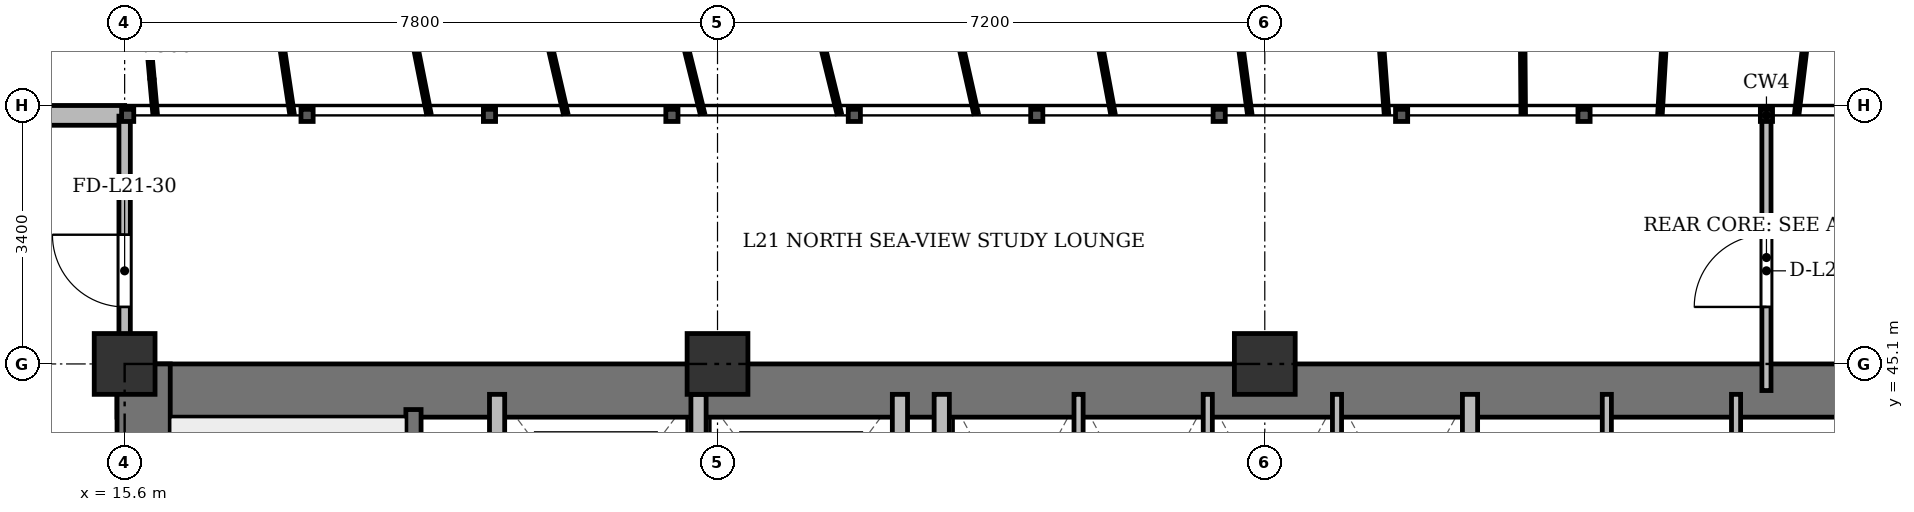
"""IFC4 building model, lengths in metres.
Left out: names, types, materials, properties, quantities, classifications, styles, units other than length and angle.
Written with IfcOpenShell. Run it as: python <this file> out.ifc"""

import sys

from ifc_helpers import new_model, si_unit, direction, frame, frame_2d, origin, origin_2d, place, context, subcontext, project, spatial, rectangle, extrude, source, transform, mapped, element, fill, save


model = new_model("IFC4")
c1 = context("Model", 3, precision=1e-05, world=origin(), true_north=direction((0.0, 1.0)))
c2 = subcontext(c1, "Body", "Model", "MODEL_VIEW")
j1 = project(units=[si_unit("LENGTHUNIT", "METRE"), si_unit("PLANEANGLEUNIT", "RADIAN")], contexts=[c1])
p1 = place(None, origin())
s1 = spatial("IfcSite", under=j1, at=p1, CompositionType="ELEMENT")
p2 = place(p1, origin())
s2 = spatial("IfcBuilding", under=s1, at=p2, CompositionType="ELEMENT")
p3 = place(p2, frame((0.0, 0.0, 85.3)))
s3 = spatial("IfcBuildingStorey", under=s2, at=p3, CompositionType="ELEMENT", Elevation=85.3)
m1 = source(origin(), c2, "Body", "SweptSolid", [
    extrude(rectangle(XDim=0.8, YDim=0.8, at=origin_2d()), origin(), (0.0, 0.0, 1.0), 3.6),
])
for number, where, z_axis, x_axis in (
    (1, (15.6, 45.1, 0.0), (0.0, 0.0, 1.0), (1.0, 0.0, 0.0)),
    (2, (23.4, 45.1, 0.0), (0.0, 0.0, 1.0), (1.0, 0.0, 0.0)),
    (3, (30.6, 45.1, 0.0), (0.0, 0.0, 1.0), (1.0, 0.0, 0.0)),
):
    element("IfcColumn", number, at=place(p3, frame(where, z_axis=z_axis, x_axis=x_axis)), inside=s3, PredefinedType="COLUMN", context=c2, shape_type="MappedRepresentation", body=[
        mapped(m1, transform((0.0, 0.0, 0.0), x_axis=(1.0, 0.0, 0.0), y_axis=(0.0, 1.0, 0.0), z_axis=(0.0, 0.0, 1.0), scale=1.0)),
    ])
p4 = place(p3, frame((7.6, 48.37, 0.0), z_axis=(0.0, 0.0, 1.0), x_axis=(1.0, 0.0, 0.0)))
e4 = element("IfcWall", 4, at=p4, inside=s3, PredefinedType="SOLIDWALL", context=c2, shape_type="SweptSolid", body=[
    extrude(rectangle(XDim=8.0, YDim=0.26, at=frame_2d((4.0, 0.0))), origin(), (0.0, 0.0, 1.0), 3.34),
])
p5 = place(p4, frame((3.325, 0.0, 0.9)))
e5 = element("IfcOpeningElement", 5, at=p5, cuts=e4, PredefinedType="OPENING", context=c2, shape_type="SweptSolid", body=[
    extrude(rectangle(XDim=1.35, YDim=1.5, at=frame_2d((0.675, 0.75))), frame((0.0, 0.14, 0.0), z_axis=(0.0, -1.0, 0.0), x_axis=(1.0, 0.0, 0.0)), (0.0, 0.0, 1.0), 0.28),
])
p6 = place(p3, frame((15.5, 44.75, 0.0), z_axis=(0.0, 0.0, 1.0), x_axis=(1.0, 0.0, 0.0)))
e6 = element("IfcWall", 6, at=p6, inside=s3, PredefinedType="SHEAR", context=c2, shape_type="SweptSolid", body=[
    extrude(rectangle(XDim=43.4, YDim=0.7, at=frame_2d((21.7, 0.0))), origin(), (0.0, 0.0, 1.0), 3.34),
])
p7 = place(p3, frame((15.85, 33.4, 0.0), z_axis=(0.0, 0.0, 1.0), x_axis=(0.0, 1.0, 0.0)))
e7 = element("IfcWall", 7, at=p7, inside=s3, PredefinedType="SHEAR", context=c2, shape_type="SweptSolid", body=[
    extrude(rectangle(XDim=11.7, YDim=0.7, at=frame_2d((5.85, 0.0))), origin(), (0.0, 0.0, 1.0), 3.34),
])
p8 = place(p3, frame((19.4, 33.4, 0.0), z_axis=(0.0, 0.0, 1.0), x_axis=(0.0, 1.0, 0.0)))
e8 = element("IfcWall", 8, at=p8, inside=s3, PredefinedType="SHEAR", context=c2, shape_type="SweptSolid", body=[
    extrude(rectangle(XDim=11.1, YDim=0.2, at=frame_2d((5.55, 0.0))), origin(), (0.0, 0.0, 1.0), 3.34),
])
p9 = place(p8, frame((0.85, 0.0, 0.0)))
e9 = element("IfcOpeningElement", 9, at=p9, cuts=e8, PredefinedType="OPENING", context=c2, shape_type="SweptSolid", body=[
    extrude(rectangle(XDim=1.1, YDim=2.15, at=frame_2d((0.55, 1.075))), frame((0.0, 0.11, 0.0), z_axis=(0.0, -1.0, 0.0), x_axis=(1.0, 0.0, 0.0)), (0.0, 0.0, 1.0), 0.22),
])
for number, where, z_axis, x_axis in (
    (10, (20.5, 41.3, 0.0), (0.0, 0.0, 1.0), (0.0, 1.0, 0.0)),
    (11, (23.15, 41.3, 0.0), (0.0, 0.0, 1.0), (0.0, 1.0, 0.0)),
    (12, (25.8, 41.3, 0.0), (0.0, 0.0, 1.0), (0.0, 1.0, 0.0)),
):
    element("IfcWall", number, at=place(p3, frame(where, z_axis=z_axis, x_axis=x_axis)), inside=s3, PredefinedType="SOLIDWALL", context=c2, shape_type="SweptSolid", body=[
        extrude(rectangle(XDim=3.4, YDim=0.2, at=frame_2d((1.7, 0.0))), origin(), (0.0, 0.0, 1.0), 3.34),
    ])
p10 = place(p3, frame((26.35, 33.4, 0.0), z_axis=(0.0, 0.0, 1.0), x_axis=(0.0, 1.0, 0.0)))
e13 = element("IfcWall", 13, at=p10, inside=s3, PredefinedType="SOLIDWALL", context=c2, shape_type="SweptSolid", body=[
    extrude(rectangle(XDim=11.3, YDim=0.2, at=frame_2d((5.65, 0.0))), origin(), (0.0, 0.0, 1.0), 2.752),
])
p11 = place(p3, frame((33.3, 41.5, 0.0), z_axis=(0.0, 0.0, 1.0), x_axis=(0.0, 1.0, 0.0)))
e14 = element("IfcWall", 14, at=p11, inside=s3, PredefinedType="SOLIDWALL", context=c2, shape_type="SweptSolid", body=[
    extrude(rectangle(XDim=3.2, YDim=0.2, at=frame_2d((1.6, 0.0))), origin(), (0.0, 0.0, 1.0), 3.34),
])
for number, where, z_axis, x_axis in (
    (15, (28.15, 41.5, 0.0), (0.0, 0.0, 1.0), (0.0, 1.0, 0.0)),
    (16, (29.85, 41.5, 0.0), (0.0, 0.0, 1.0), (0.0, 1.0, 0.0)),
    (17, (31.55, 41.5, 0.0), (0.0, 0.0, 1.0), (0.0, 1.0, 0.0)),
    (18, (35.1, 41.5, 0.0), (0.0, 0.0, 1.0), (0.0, 1.0, 0.0)),
    (19, (36.8, 41.5, 0.0), (0.0, 0.0, 1.0), (0.0, 1.0, 0.0)),
):
    element("IfcWall", number, at=place(p3, frame(where, z_axis=z_axis, x_axis=x_axis)), inside=s3, PredefinedType="PARTITIONING", context=c2, shape_type="SweptSolid", body=[
        extrude(rectangle(XDim=3.2, YDim=0.12, at=frame_2d((1.6, 0.0))), origin(), (0.0, 0.0, 1.0), 3.34),
    ])
p12 = place(p3, frame((37.2, 44.75, 0.0), z_axis=(0.0, 0.0, 1.0), x_axis=(0.0, 1.0, 0.0)))
e20 = element("IfcWall", 20, at=p12, inside=s3, PredefinedType="PARTITIONING", context=c2, shape_type="SweptSolid", body=[
    extrude(rectangle(XDim=3.61, YDim=0.12, at=frame_2d((1.805, 0.0))), origin(), (0.0, 0.0, 1.0), 2.752),
])
p13 = place(p12, frame((1.1, 0.0, 0.0)))
e21 = element("IfcOpeningElement", 21, at=p13, cuts=e20, PredefinedType="OPENING", context=c2, shape_type="SweptSolid", body=[
    extrude(rectangle(XDim=0.95, YDim=2.15, at=frame_2d((0.475, 1.075))), frame((0.0, 0.07, 0.0), z_axis=(0.0, -1.0, 0.0), x_axis=(1.0, 0.0, 0.0)), (0.0, 0.0, 1.0), 0.14),
])
p14 = place(p3, frame((15.6, 44.75, 0.0), z_axis=(0.0, 0.0, 1.0), x_axis=(0.0, 1.0, 0.0)))
e22 = element("IfcWall", 22, at=p14, inside=s3, PredefinedType="PARTITIONING", context=c2, shape_type="SweptSolid", body=[
    extrude(rectangle(XDim=3.61, YDim=0.15, at=frame_2d((1.805, 0.0))), origin(), (0.0, 0.0, 1.0), 2.84),
])
p15 = place(p14, frame((1.1, 0.0, 0.0)))
e23 = element("IfcOpeningElement", 23, at=p15, cuts=e22, PredefinedType="OPENING", context=c2, shape_type="SweptSolid", body=[
    extrude(rectangle(XDim=0.95, YDim=2.15, at=frame_2d((0.475, 1.075))), frame((0.0, 0.085, 0.0), z_axis=(0.0, -1.0, 0.0), x_axis=(1.0, 0.0, 0.0)), (0.0, 0.0, 1.0), 0.17),
])
m2 = source(origin(), c2, "Body", "SweptSolid", [
    extrude(rectangle(XDim=0.95, YDim=2.15, at=frame_2d((0.475, 1.075))), frame((0.0, 0.025, 0.0), z_axis=(0.0, -1.0, 0.0), x_axis=(1.0, 0.0, 0.0)), (0.0, 0.0, 1.0), 0.05),
])
p16 = place(p13, origin())
e24 = element("IfcDoor", 24, at=p16, inside=s3, OperationType="SINGLE_SWING_LEFT", PredefinedType="DOOR", context=c2, shape_type="MappedRepresentation", body=[
    mapped(m2, transform((0.0, 0.0, 0.0), x_axis=(1.0, 0.0, 0.0), y_axis=(0.0, 1.0, 0.0), z_axis=(0.0, 0.0, 1.0), scale=1.0)),
])
fill(e21, e24)
p17 = place(p15, origin())
e25 = element("IfcDoor", 25, at=p17, inside=s3, OperationType="SINGLE_SWING_RIGHT", PredefinedType="DOOR", context=c2, shape_type="MappedRepresentation", body=[
    mapped(m2, transform((0.0, 0.0, 0.0), x_axis=(1.0, 0.0, 0.0), y_axis=(0.0, 1.0, 0.0), z_axis=(0.0, 0.0, 1.0), scale=1.0)),
])
fill(e23, e25)
save(model, sys.argv[1])
